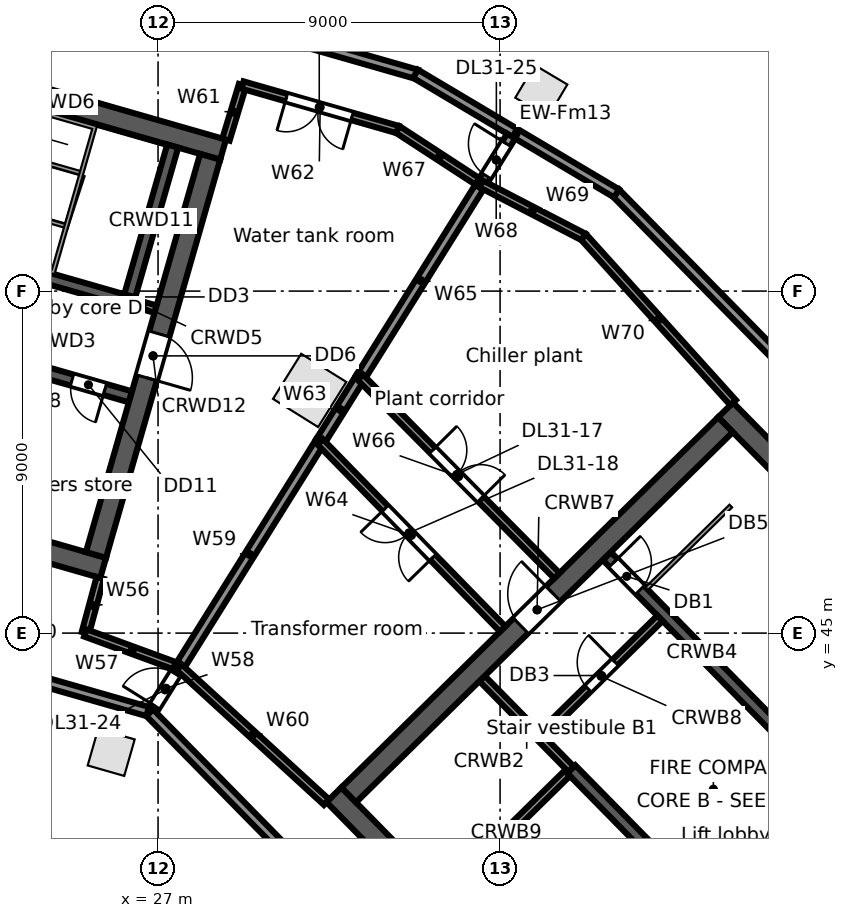
"""IFC4 building model, lengths in metres.
Left out: names, types, materials, properties, quantities, classifications, styles, units other than length and angle.
Written with IfcOpenShell. Run it as: python <this file> out.ifc"""

import sys

from ifc_helpers import new_model, si_unit, direction, frame, frame_2d, origin, origin_2d, place, context, subcontext, project, spatial, rectangle, extrude, element, fill, save


model = new_model("IFC4")
c1 = context("Model", 3, precision=1e-05, world=origin(), true_north=direction((0.0, 1.0)))
c2 = subcontext(c1, "Body", "Model", "MODEL_VIEW")
j1 = project(units=[si_unit("LENGTHUNIT", "METRE"), si_unit("PLANEANGLEUNIT", "RADIAN")], contexts=[c1])
p1 = place(None, origin())
s1 = spatial("IfcSite", under=j1, at=p1, CompositionType="ELEMENT")
p2 = place(p1, origin())
s2 = spatial("IfcBuilding", under=s1, at=p2, CompositionType="ELEMENT")
p3 = place(p2, frame((0.0, 0.0, 149.9)))
s3 = spatial("IfcBuildingStorey", under=s2, at=p3, CompositionType="ELEMENT", Elevation=149.9)
for number, where, z_axis, x_axis in (
    (1, (37.085, 59.262, 0.0), (0.0, 0.0, 1.0), (-0.859, 0.511, 0.0)),
    (2, (25.767, 41.86, 0.0), (0.0, 0.0, 1.0), (0.961, -0.276, 0.0)),
):
    element("IfcColumn", number, at=place(p3, frame(where, z_axis=z_axis, x_axis=x_axis)), inside=s3, PredefinedType="COLUMN", context=c2, shape_type="SweptSolid", body=[
        extrude(rectangle(XDim=1.0, YDim=1.0, at=origin_2d()), origin(), (0.0, 0.0, 1.0), 4.68),
    ])
p4 = place(p3, frame((30.99, 51.386, 0.0), z_axis=(0.0, 0.0, 1.0), x_axis=(0.529919264233, 0.848048096156, 0.0)))
e3 = element("IfcColumn", 3, at=p4, inside=s3, PredefinedType="COLUMN", context=c2, shape_type="SweptSolid", body=[
    extrude(rectangle(XDim=1.4, YDim=1.4, at=origin_2d()), origin(), (0.0, 0.0, 1.0), 5.0),
])
p5 = place(p3, frame((3.135, 68.5, 0.0), z_axis=(0.0, 0.0, 1.0), x_axis=(0.961261620067, -0.275637620413, 0.0)))
e4 = element("IfcWall", 4, at=p5, inside=s3, PredefinedType="STANDARD", context=c2, shape_type="SweptSolid", body=[
    extrude(rectangle(XDim=31.907, YDim=0.25, at=frame_2d((15.953, 0.0))), origin(), (0.0, 0.0, 1.0), 3.768),
])
p6 = place(p3, frame((26.726, 42.937, 0.0), z_axis=(0.0, 0.0, 1.0), x_axis=(-0.96126039977, 0.275641876052, 0.0)))
e5 = element("IfcWall", 5, at=p6, inside=s3, PredefinedType="STANDARD", context=c2, shape_type="SweptSolid", body=[
    extrude(rectangle(XDim=28.083, YDim=0.25, at=frame_2d((14.041, 0.0))), origin(), (0.0, 0.0, 1.0), 3.768),
])
p7 = place(p3, frame((39.897, 29.558, 0.0), z_axis=(0.0, 0.0, 1.0), x_axis=(-0.700908640523, 0.713251062137, 0.0)))
e6 = element("IfcWall", 6, at=p7, inside=s3, PredefinedType="STANDARD", context=c2, shape_type="SweptSolid", body=[
    extrude(rectangle(XDim=18.712, YDim=0.25, at=frame_2d((9.356, 0.0))), origin(), (0.0, 0.0, 1.0), 4.68),
])
p8 = place(p3, frame((39.04, 56.592, 0.0), z_axis=(0.0, 0.0, 1.0), x_axis=(0.700912545681, -0.713247224535, 0.0)))
e7 = element("IfcWall", 7, at=p8, inside=s3, PredefinedType="STANDARD", context=c2, shape_type="SweptSolid", body=[
    extrude(rectangle(XDim=25.157, YDim=0.25, at=frame_2d((12.579, 0.0))), origin(), (0.0, 0.0, 1.0), 4.68),
])
p9 = place(p3, frame((33.776, 59.719, 0.0), z_axis=(0.0, 0.0, 1.0), x_axis=(0.859411998598, -0.511283694896, 0.0)))
e8 = element("IfcWall", 8, at=p9, inside=s3, PredefinedType="STANDARD", context=c2, shape_type="SweptSolid", body=[
    extrude(rectangle(XDim=6.155, YDim=0.25, at=frame_2d((3.077, 0.0))), origin(), (0.0, 0.0, 1.0), 3.972),
])
p10 = place(p3, frame((31.628, 40.745, 0.0), z_axis=(0.0, 0.0, 1.0), x_axis=(0.700911255944, -0.713248491965, 0.0)))
e9 = element("IfcWall", 9, at=p10, inside=s3, PredefinedType="SOLIDWALL", context=c2, shape_type="SweptSolid", body=[
    extrude(rectangle(XDim=15.0, YDim=0.55, at=frame_2d((7.5, 0.0))), origin(), (0.0, 0.0, 1.0), 4.68),
])
p11 = place(p10, frame((12.9, 0.0, 0.0)))
e10 = element("IfcOpeningElement", 10, at=p11, cuts=e9, PredefinedType="OPENING", context=c2, shape_type="SweptSolid", body=[
    extrude(rectangle(XDim=1.2, YDim=2.1, at=frame_2d((0.6, 1.05))), frame((0.0, 0.285, 0.0), z_axis=(0.0, -1.0, 0.0), x_axis=(1.0, 0.0, 0.0)), (0.0, 0.0, 1.0), 0.57),
])
p12 = place(p3, frame((35.526, 43.805, 0.0), z_axis=(0.0, 0.0, 1.0), x_axis=(0.700884863746, -0.713274426691, 0.0)))
e11 = element("IfcWall", 11, at=p12, inside=s3, PredefinedType="SOLIDWALL", context=c2, shape_type="SweptSolid", body=[
    extrude(rectangle(XDim=3.35, YDim=0.2, at=frame_2d((1.675, 0.0))), origin(), (0.0, 0.0, 1.0), 4.68),
])
p13 = place(p3, frame((37.874, 41.416, 0.0), z_axis=(0.0, 0.0, 1.0), x_axis=(0.700918271237, -0.71324159795, 0.0)))
e12 = element("IfcWall", 12, at=p13, inside=s3, PredefinedType="SOLIDWALL", context=c2, shape_type="SweptSolid", body=[
    extrude(rectangle(XDim=8.4, YDim=0.3, at=frame_2d((4.2, 0.0))), origin(), (0.0, 0.0, 1.0), 4.68),
])
p14 = place(p3, frame((38.807, 47.029, 0.0), z_axis=(0.0, 0.0, 1.0), x_axis=(0.700916852778, -0.713242991898, 0.0)))
e13 = element("IfcWall", 13, at=p14, inside=s3, PredefinedType="SOLIDWALL", context=c2, shape_type="SweptSolid", body=[
    extrude(rectangle(XDim=7.15, YDim=0.3, at=frame_2d((3.575, 0.0))), origin(), (0.0, 0.0, 1.0), 4.68),
])
p15 = place(p14, frame((0.25, 0.0, 0.0)))
e14 = element("IfcOpeningElement", 14, at=p15, cuts=e13, PredefinedType="OPENING", context=c2, shape_type="SweptSolid", body=[
    extrude(rectangle(XDim=1.0, YDim=2.1, at=frame_2d((0.5, 1.05))), frame((0.0, 0.16, 0.0), z_axis=(0.0, -1.0, 0.0), x_axis=(1.0, 0.0, 0.0)), (0.0, 0.0, 1.0), 0.32),
])
p16 = place(p3, frame((41.934, 50.873, 0.0), z_axis=(0.0, 0.0, 1.0), x_axis=(0.700911255944, -0.713248491965, 0.0)))
e15 = element("IfcWall", 15, at=p16, inside=s3, PredefinedType="SOLIDWALL", context=c2, shape_type="SweptSolid", body=[
    extrude(rectangle(XDim=15.0, YDim=0.55, at=frame_2d((7.5, 0.0))), origin(), (0.0, 0.0, 1.0), 4.68),
])
p17 = place(p3, frame((32.017, 40.742, 0.0), z_axis=(0.0, 0.0, 1.0), x_axis=(0.713253550094, 0.700906108746, 0.0)))
e16 = element("IfcWall", 16, at=p17, inside=s3, PredefinedType="SOLIDWALL", context=c2, shape_type="SweptSolid", body=[
    extrude(rectangle(XDim=13.9, YDim=0.55, at=frame_2d((6.95, 0.0))), origin(), (0.0, 0.0, 1.0), 4.68),
])
p18 = place(p17, frame((6.35, 0.0, 0.0)))
e17 = element("IfcOpeningElement", 17, at=p18, cuts=e16, PredefinedType="OPENING", context=c2, shape_type="SweptSolid", body=[
    extrude(rectangle(XDim=1.2, YDim=2.1, at=frame_2d((0.6, 1.05))), frame((0.0, 0.285, 0.0), z_axis=(0.0, -1.0, 0.0), x_axis=(1.0, 0.0, 0.0)), (0.0, 0.0, 1.0), 0.57),
])
p19 = place(p3, frame((37.104, 42.342, 0.0), z_axis=(0.0, 0.0, 1.0), x_axis=(0.713281298468, 0.700877870428, 0.0)))
e18 = element("IfcWall", 18, at=p19, inside=s3, PredefinedType="PARTITIONING", context=c2, shape_type="SweptSolid", body=[
    extrude(rectangle(XDim=4.35, YDim=0.2, at=frame_2d((2.175, 0.0))), origin(), (0.0, 0.0, 1.0), 4.68),
])
p20 = place(p19, frame((1.7, 0.0, 0.0)))
e19 = element("IfcOpeningElement", 19, at=p20, cuts=e18, PredefinedType="OPENING", context=c2, shape_type="SweptSolid", body=[
    extrude(rectangle(XDim=1.0, YDim=2.1, at=frame_2d((0.5, 1.05))), frame((0.0, 0.11, 0.0), z_axis=(0.0, -1.0, 0.0), x_axis=(1.0, 0.0, 0.0)), (0.0, 0.0, 1.0), 0.22),
])
p21 = place(p3, frame((34.558, 38.156, 0.0), z_axis=(0.0, 0.0, 1.0), x_axis=(0.713237924006, 0.700922009755, 0.0)))
e20 = element("IfcWall", 20, at=p21, inside=s3, PredefinedType="SOLIDWALL", context=c2, shape_type="SweptSolid", body=[
    extrude(rectangle(XDim=4.5, YDim=0.2, at=frame_2d((2.25, 0.0))), origin(), (0.0, 0.0, 1.0), 4.68),
])
p22 = place(p3, frame((42.145, 30.435, 0.0), z_axis=(0.0, 0.0, 1.0), x_axis=(0.713253550094, 0.700906108746, 0.0)))
e21 = element("IfcWall", 21, at=p22, inside=s3, PredefinedType="SOLIDWALL", context=c2, shape_type="SweptSolid", body=[
    extrude(rectangle(XDim=13.9, YDim=0.55, at=frame_2d((6.95, 0.0))), origin(), (0.0, 0.0, 1.0), 4.68),
])
p23 = place(p3, frame((16.904, 49.197, 0.0), z_axis=(0.0, 0.0, 1.0), x_axis=(0.96126248289, -0.275634611374, 0.0)))
e22 = element("IfcWall", 22, at=p23, inside=s3, PredefinedType="SOLIDWALL", context=c2, shape_type="SweptSolid", body=[
    extrude(rectangle(XDim=9.0, YDim=0.55, at=frame_2d((4.5, 0.0))), origin(), (0.0, 0.0, 1.0), 4.68),
])
p24 = place(p3, frame((21.131, 52.692, 0.0), z_axis=(0.0, 0.0, 1.0), x_axis=(0.961265220997, -0.27562506218, 0.0)))
e23 = element("IfcWall", 23, at=p24, inside=s3, PredefinedType="SOLIDWALL", context=c2, shape_type="SweptSolid", body=[
    extrude(rectangle(XDim=5.35, YDim=0.3, at=frame_2d((2.675, 0.0))), origin(), (0.0, 0.0, 1.0), 4.68),
])
p25 = place(p24, frame((0.95, 0.0, 0.0)))
e24 = element("IfcOpeningElement", 24, at=p25, cuts=e23, PredefinedType="OPENING", context=c2, shape_type="SweptSolid", body=[
    extrude(rectangle(XDim=0.9, YDim=2.1, at=frame_2d((0.45, 1.05))), frame((0.0, 0.16, 0.0), z_axis=(0.0, -1.0, 0.0), x_axis=(1.0, 0.0, 0.0)), (0.0, 0.0, 1.0), 0.32),
])
p26 = place(p24, frame((3.75, 0.0, 0.0)))
e25 = element("IfcOpeningElement", 25, at=p26, cuts=e23, PredefinedType="OPENING", context=c2, shape_type="SweptSolid", body=[
    extrude(rectangle(XDim=0.9, YDim=2.1, at=frame_2d((0.45, 1.05))), frame((0.0, 0.16, 0.0), z_axis=(0.0, -1.0, 0.0), x_axis=(1.0, 0.0, 0.0)), (0.0, 0.0, 1.0), 0.32),
])
p27 = place(p3, frame((19.341, 55.702, 0.0), z_axis=(0.0, 0.0, 1.0), x_axis=(0.961263228157, -0.27563201228, 0.0)))
e26 = element("IfcWall", 26, at=p27, inside=s3, PredefinedType="SOLIDWALL", context=c2, shape_type="SweptSolid", body=[
    extrude(rectangle(XDim=7.15, YDim=0.3, at=frame_2d((3.575, 0.0))), origin(), (0.0, 0.0, 1.0), 4.68),
])
p28 = place(p27, frame((0.25, 0.0, 0.0)))
e27 = element("IfcOpeningElement", 27, at=p28, cuts=e26, PredefinedType="OPENING", context=c2, shape_type="SweptSolid", body=[
    extrude(rectangle(XDim=1.0, YDim=2.1, at=frame_2d((0.5, 1.05))), frame((0.0, 0.16, 0.0), z_axis=(0.0, -1.0, 0.0), x_axis=(1.0, 0.0, 0.0)), (0.0, 0.0, 1.0), 0.32),
])
p29 = place(p3, frame((26.214, 53.732, 0.0), z_axis=(0.0, 0.0, 1.0), x_axis=(0.961240918172, -0.275709806194, 0.0)))
e28 = element("IfcWall", 28, at=p29, inside=s3, PredefinedType="SOLIDWALL", context=c2, shape_type="SweptSolid", body=[
    extrude(rectangle(XDim=0.75, YDim=0.2, at=frame_2d((0.375, 0.0))), origin(), (0.0, 0.0, 1.0), 4.68),
])
p30 = place(p3, frame((20.06, 60.204, 0.0), z_axis=(0.0, 0.0, 1.0), x_axis=(0.96126248289, -0.275634611374, 0.0)))
e29 = element("IfcWall", 29, at=p30, inside=s3, PredefinedType="SOLIDWALL", context=c2, shape_type="SweptSolid", body=[
    extrude(rectangle(XDim=9.0, YDim=0.55, at=frame_2d((4.5, 0.0))), origin(), (0.0, 0.0, 1.0), 4.68),
])
p31 = place(p3, frame((26.256, 53.876, 0.0), z_axis=(0.0, 0.0, 1.0), x_axis=(0.275641165445, 0.961260603537, 0.0)))
e30 = element("IfcWall", 30, at=p31, inside=s3, PredefinedType="SOLIDWALL", context=c2, shape_type="SweptSolid", body=[
    extrude(rectangle(XDim=4.1, YDim=0.3, at=frame_2d((2.05, 0.0))), origin(), (0.0, 0.0, 1.0), 4.68),
])
p32 = place(p3, frame((25.366, 47.057, 0.0), z_axis=(0.0, 0.0, 1.0), x_axis=(0.275632146085, 0.96126318979, 0.0)))
e31 = element("IfcWall", 31, at=p32, inside=s3, PredefinedType="SOLIDWALL", context=c2, shape_type="SweptSolid", body=[
    extrude(rectangle(XDim=10.9, YDim=0.55, at=frame_2d((5.45, 0.0))), origin(), (0.0, 0.0, 1.0), 4.68),
])
p33 = place(p32, frame((4.85, 0.0, 0.0)))
e32 = element("IfcOpeningElement", 32, at=p33, cuts=e31, PredefinedType="OPENING", context=c2, shape_type="SweptSolid", body=[
    extrude(rectangle(XDim=1.2, YDim=2.1, at=frame_2d((0.6, 1.05))), frame((0.0, 0.285, 0.0), z_axis=(0.0, -1.0, 0.0), x_axis=(1.0, 0.0, 0.0)), (0.0, 0.0, 1.0), 0.57),
])
p34 = place(p3, frame((25.088, 45.004, 0.0), z_axis=(0.0, 0.0, 1.0), x_axis=(0.260761429939, 0.965403271517, 0.0)))
e33 = element("IfcWall", 33, at=p34, inside=s3, PredefinedType="PARTITIONING", context=c2, shape_type="SweptSolid", body=[
    extrude(rectangle(XDim=1.5, YDim=0.2, at=frame_2d((0.75, 0.0))), origin(), (0.0, 0.0, 1.0), 4.68),
])
p35 = place(p3, frame((25.088, 45.004, 0.0), z_axis=(0.0, 0.0, 1.0), x_axis=(0.93889532653, -0.344202797519, 0.0)))
e34 = element("IfcWall", 34, at=p35, inside=s3, PredefinedType="PARTITIONING", context=c2, shape_type="SweptSolid", body=[
    extrude(rectangle(XDim=2.629, YDim=0.2, at=frame_2d((1.314, 0.0))), origin(), (0.0, 0.0, 1.0), 3.852),
])
p36 = place(p3, frame((26.867, 42.996, 0.0), z_axis=(0.0, 0.0, 1.0), x_axis=(0.529762680017, 0.848145920736, 0.0)))
e35 = element("IfcWall", 35, at=p36, inside=s3, PredefinedType="PARTITIONING", context=c2, shape_type="SweptSolid", body=[
    extrude(rectangle(XDim=1.301, YDim=0.25, at=frame_2d((0.65, 0.0))), origin(), (0.0, 0.0, 1.0), 4.68),
])
p37 = place(p36, frame((0.1, 0.0, 0.0)))
e36 = element("IfcOpeningElement", 36, at=p37, cuts=e35, PredefinedType="OPENING", context=c2, shape_type="SweptSolid", body=[
    extrude(rectangle(XDim=1.0, YDim=2.1, at=frame_2d((0.5, 1.05))), frame((0.0, 0.135, 0.0), z_axis=(0.0, -1.0, 0.0), x_axis=(1.0, 0.0, 0.0)), (0.0, 0.0, 1.0), 0.27),
])
p38 = place(p3, frame((27.556, 44.099, 0.0), z_axis=(0.0, 0.0, 1.0), x_axis=(0.529908011914, 0.848055127282, 0.0)))
e37 = element("IfcWall", 37, at=p38, inside=s3, PredefinedType="PARTITIONING", context=c2, shape_type="SweptSolid", body=[
    extrude(rectangle(XDim=6.999, YDim=0.25, at=frame_2d((3.5, 0.0))), origin(), (0.0, 0.0, 1.0), 4.68),
])
p39 = place(p3, frame((27.556, 44.099, 0.0), z_axis=(0.0, 0.0, 1.0), x_axis=(0.737709390417, -0.675118400942, 0.0)))
e38 = element("IfcWall", 38, at=p39, inside=s3, PredefinedType="PARTITIONING", context=c2, shape_type="SweptSolid", body=[
    extrude(rectangle(XDim=5.254, YDim=0.2, at=frame_2d((2.627, 0.0))), origin(), (0.0, 0.0, 1.0), 4.68),
])
p40 = place(p3, frame((28.787, 57.987, 0.0), z_axis=(0.0, 0.0, 1.0), x_axis=(0.290391164202, 0.9569080268, 0.0)))
e39 = element("IfcWall", 39, at=p40, inside=s3, PredefinedType="PARTITIONING", context=c2, shape_type="SweptSolid", body=[
    extrude(rectangle(XDim=1.501, YDim=0.2, at=frame_2d((0.75, 0.0))), origin(), (0.0, 0.0, 1.0), 4.68),
])
p41 = place(p3, frame((29.223, 59.423, 0.0), z_axis=(0.0, 0.0, 1.0), x_axis=(0.961217704803, -0.27579072496, 0.0)))
e40 = element("IfcWall", 40, at=p41, inside=s3, PredefinedType="PARTITIONING", context=c2, shape_type="SweptSolid", body=[
    extrude(rectangle(XDim=4.25, YDim=0.2, at=frame_2d((2.125, 0.0))), origin(), (0.0, 0.0, 1.0), 4.68),
])
p42 = place(p41, frame((1.2, 0.0, 0.0)))
e41 = element("IfcOpeningElement", 41, at=p42, cuts=e40, PredefinedType="OPENING", context=c2, shape_type="SweptSolid", body=[
    extrude(rectangle(XDim=1.8, YDim=2.1, at=frame_2d((0.9, 1.05))), frame((0.0, 0.11, 0.0), z_axis=(0.0, -1.0, 0.0), x_axis=(1.0, 0.0, 0.0)), (0.0, 0.0, 1.0), 0.22),
])
p43 = place(p3, frame((31.265, 50.035, 0.0), z_axis=(0.0, 0.0, 1.0), x_axis=(0.53000991217, 0.847991446302, 0.0)))
e42 = element("IfcWall", 42, at=p43, inside=s3, PredefinedType="PARTITIONING", context=c2, shape_type="SweptSolid", body=[
    extrude(rectangle(XDim=2.0, YDim=0.25, at=frame_2d((1.0, 0.0))), origin(), (0.0, 0.0, 1.0), 4.68),
])
p44 = place(p3, frame((31.265, 50.035, 0.0), z_axis=(0.0, 0.0, 1.0), x_axis=(0.698055115478, -0.716044031995, 0.0)))
e43 = element("IfcWall", 43, at=p44, inside=s3, PredefinedType="PARTITIONING", context=c2, shape_type="SweptSolid", body=[
    extrude(rectangle(XDim=6.881, YDim=0.2, at=frame_2d((3.44, 0.0))), origin(), (0.0, 0.0, 1.0), 4.68),
])
p45 = place(p44, frame((2.45, 0.0, 0.0)))
e44 = element("IfcOpeningElement", 44, at=p45, cuts=e43, PredefinedType="OPENING", context=c2, shape_type="SweptSolid", body=[
    extrude(rectangle(XDim=1.8, YDim=2.1, at=frame_2d((0.9, 1.05))), frame((0.0, 0.11, 0.0), z_axis=(0.0, -1.0, 0.0), x_axis=(1.0, 0.0, 0.0)), (0.0, 0.0, 1.0), 0.22),
])
p46 = place(p3, frame((32.325, 51.731, 0.0), z_axis=(0.0, 0.0, 1.0), x_axis=(0.529980652467, 0.848009733441, 0.0)))
e45 = element("IfcWall", 45, at=p46, inside=s3, PredefinedType="PARTITIONING", context=c2, shape_type="SweptSolid", body=[
    extrude(rectangle(XDim=6.0, YDim=0.25, at=frame_2d((3.0, 0.0))), origin(), (0.0, 0.0, 1.0), 4.68),
])
p47 = place(p3, frame((32.325, 51.731, 0.0), z_axis=(0.0, 0.0, 1.0), x_axis=(0.703558862732, -0.710636986563, 0.0)))
e46 = element("IfcWall", 46, at=p47, inside=s3, PredefinedType="PARTITIONING", context=c2, shape_type="SweptSolid", body=[
    extrude(rectangle(XDim=7.347, YDim=0.2, at=frame_2d((3.673, 0.0))), origin(), (0.0, 0.0, 1.0), 4.68),
])
p48 = place(p47, frame((2.7, 0.0, 0.0)))
e47 = element("IfcOpeningElement", 47, at=p48, cuts=e46, PredefinedType="OPENING", context=c2, shape_type="SweptSolid", body=[
    extrude(rectangle(XDim=1.8, YDim=2.1, at=frame_2d((0.9, 1.05))), frame((0.0, 0.11, 0.0), z_axis=(0.0, -1.0, 0.0), x_axis=(1.0, 0.0, 0.0)), (0.0, 0.0, 1.0), 0.22),
])
p49 = place(p3, frame((33.308, 58.251, 0.0), z_axis=(0.0, 0.0, 1.0), x_axis=(0.837749484824, -0.546054759779, 0.0)))
e48 = element("IfcWall", 48, at=p49, inside=s3, PredefinedType="PARTITIONING", context=c2, shape_type="SweptSolid", body=[
    extrude(rectangle(XDim=2.622, YDim=0.2, at=frame_2d((1.311, 0.0))), origin(), (0.0, 0.0, 1.0), 3.952),
])
p50 = place(p3, frame((35.505, 56.819, 0.0), z_axis=(0.0, 0.0, 1.0), x_axis=(0.529998940003, 0.847998304005, 0.0)))
e49 = element("IfcWall", 49, at=p50, inside=s3, PredefinedType="PARTITIONING", context=c2, shape_type="SweptSolid", body=[
    extrude(rectangle(XDim=1.483, YDim=0.25, at=frame_2d((0.742, 0.0))), origin(), (0.0, 0.0, 1.0), 3.952),
])
p51 = place(p50, frame((0.25, 0.0, 0.0)))
e50 = element("IfcOpeningElement", 50, at=p51, cuts=e49, PredefinedType="OPENING", context=c2, shape_type="SweptSolid", body=[
    extrude(rectangle(XDim=1.0, YDim=2.1, at=frame_2d((0.5, 1.05))), frame((0.0, 0.135, 0.0), z_axis=(0.0, -1.0, 0.0), x_axis=(1.0, 0.0, 0.0)), (0.0, 0.0, 1.0), 0.27),
])
p52 = place(p3, frame((35.505, 56.819, 0.0), z_axis=(0.0, 0.0, 1.0), x_axis=(0.887881146957, -0.460072895179, 0.0)))
e51 = element("IfcWall", 51, at=p52, inside=s3, PredefinedType="PARTITIONING", context=c2, shape_type="SweptSolid", body=[
    extrude(rectangle(XDim=3.034, YDim=0.2, at=frame_2d((1.517, 0.0))), origin(), (0.0, 0.0, 1.0), 4.68),
])
p53 = place(p3, frame((38.199, 55.423, 0.0), z_axis=(0.0, 0.0, 1.0), x_axis=(0.669853780439, -0.742493038911, 0.0)))
e52 = element("IfcWall", 52, at=p53, inside=s3, PredefinedType="PARTITIONING", context=c2, shape_type="SweptSolid", body=[
    extrude(rectangle(XDim=5.868, YDim=0.2, at=frame_2d((2.934, 0.0))), origin(), (0.0, 0.0, 1.0), 4.68),
])
p54 = place(p15, origin())
e53 = element("IfcDoor", 53, at=p54, inside=s3, OperationType="SINGLE_SWING_LEFT", PredefinedType="DOOR", context=c2, shape_type="SweptSolid", body=[
    extrude(rectangle(XDim=1.0, YDim=2.1, at=frame_2d((0.5, 1.05))), frame((0.0, 0.025, 0.0), z_axis=(0.0, -1.0, 0.0), x_axis=(1.0, 0.0, 0.0)), (0.0, 0.0, 1.0), 0.05),
])
fill(e14, e53)
p55 = place(p20, origin())
e54 = element("IfcDoor", 54, at=p55, inside=s3, OperationType="SINGLE_SWING_RIGHT", PredefinedType="DOOR", context=c2, shape_type="SweptSolid", body=[
    extrude(rectangle(XDim=1.0, YDim=2.1, at=frame_2d((0.5, 1.05))), frame((0.0, 0.025, 0.0), z_axis=(0.0, -1.0, 0.0), x_axis=(1.0, 0.0, 0.0)), (0.0, 0.0, 1.0), 0.05),
])
fill(e19, e54)
p56 = place(p18, origin())
e55 = element("IfcDoor", 55, at=p56, inside=s3, OperationType="SINGLE_SWING_RIGHT", PredefinedType="DOOR", context=c2, shape_type="SweptSolid", body=[
    extrude(rectangle(XDim=1.2, YDim=2.1, at=frame_2d((0.6, 1.05))), frame((0.0, 0.025, 0.0), z_axis=(0.0, -1.0, 0.0), x_axis=(1.0, 0.0, 0.0)), (0.0, 0.0, 1.0), 0.05),
])
fill(e17, e55)
p57 = place(p33, frame((1.2, 0.0, 0.0), z_axis=(0.0, 0.0, 1.0), x_axis=(-1.0, 0.0, 0.0)))
e56 = element("IfcDoor", 56, at=p57, inside=s3, OperationType="SINGLE_SWING_RIGHT", PredefinedType="DOOR", context=c2, shape_type="SweptSolid", body=[
    extrude(rectangle(XDim=1.2, YDim=2.1, at=frame_2d((0.6, 1.05))), frame((0.0, 0.025, 0.0), z_axis=(0.0, -1.0, 0.0), x_axis=(1.0, 0.0, 0.0)), (0.0, 0.0, 1.0), 0.05),
])
fill(e32, e56)
p58 = place(p26, frame((0.9, 0.0, 0.0), z_axis=(0.0, 0.0, 1.0), x_axis=(-1.0, 0.0, 0.0)))
e57 = element("IfcDoor", 57, at=p58, inside=s3, OperationType="SINGLE_SWING_LEFT", PredefinedType="DOOR", context=c2, shape_type="SweptSolid", body=[
    extrude(rectangle(XDim=0.9, YDim=2.1, at=frame_2d((0.45, 1.05))), frame((0.0, 0.025, 0.0), z_axis=(0.0, -1.0, 0.0), x_axis=(1.0, 0.0, 0.0)), (0.0, 0.0, 1.0), 0.05),
])
fill(e25, e57)
p59 = place(p42, frame((1.8, 0.0, 0.0), z_axis=(0.0, 0.0, 1.0), x_axis=(-1.0, 0.0, 0.0)))
e58 = element("IfcDoor", 58, at=p59, inside=s3, OperationType="DOUBLE_DOOR_SINGLE_SWING", PredefinedType="DOOR", context=c2, shape_type="SweptSolid", body=[
    extrude(rectangle(XDim=1.8, YDim=2.1, at=frame_2d((0.9, 1.05))), frame((0.0, 0.025, 0.0), z_axis=(0.0, -1.0, 0.0), x_axis=(1.0, 0.0, 0.0)), (0.0, 0.0, 1.0), 0.05),
])
fill(e41, e58)
p60 = place(p48, origin())
e59 = element("IfcDoor", 59, at=p60, inside=s3, OperationType="DOUBLE_DOOR_SINGLE_SWING", PredefinedType="DOOR", context=c2, shape_type="SweptSolid", body=[
    extrude(rectangle(XDim=1.8, YDim=2.1, at=frame_2d((0.9, 1.05))), frame((0.0, 0.025, 0.0), z_axis=(0.0, -1.0, 0.0), x_axis=(1.0, 0.0, 0.0)), (0.0, 0.0, 1.0), 0.05),
])
fill(e47, e59)
p61 = place(p45, frame((1.8, 0.0, 0.0), z_axis=(0.0, 0.0, 1.0), x_axis=(-1.0, 0.0, 0.0)))
e60 = element("IfcDoor", 60, at=p61, inside=s3, OperationType="DOUBLE_DOOR_SINGLE_SWING", PredefinedType="DOOR", context=c2, shape_type="SweptSolid", body=[
    extrude(rectangle(XDim=1.8, YDim=2.1, at=frame_2d((0.9, 1.05))), frame((0.0, 0.025, 0.0), z_axis=(0.0, -1.0, 0.0), x_axis=(1.0, 0.0, 0.0)), (0.0, 0.0, 1.0), 0.05),
])
fill(e44, e60)
p62 = place(p37, origin())
e61 = element("IfcDoor", 61, at=p62, inside=s3, OperationType="SINGLE_SWING_LEFT", PredefinedType="DOOR", context=c2, shape_type="SweptSolid", body=[
    extrude(rectangle(XDim=1.0, YDim=2.1, at=frame_2d((0.5, 1.05))), frame((0.0, 0.025, 0.0), z_axis=(0.0, -1.0, 0.0), x_axis=(1.0, 0.0, 0.0)), (0.0, 0.0, 1.0), 0.05),
])
fill(e36, e61)
p63 = place(p51, origin())
e62 = element("IfcDoor", 62, at=p63, inside=s3, OperationType="SINGLE_SWING_RIGHT", PredefinedType="DOOR", context=c2, shape_type="SweptSolid", body=[
    extrude(rectangle(XDim=1.0, YDim=2.1, at=frame_2d((0.5, 1.05))), frame((0.0, 0.025, 0.0), z_axis=(0.0, -1.0, 0.0), x_axis=(1.0, 0.0, 0.0)), (0.0, 0.0, 1.0), 0.05),
])
fill(e50, e62)
save(model, sys.argv[1])
